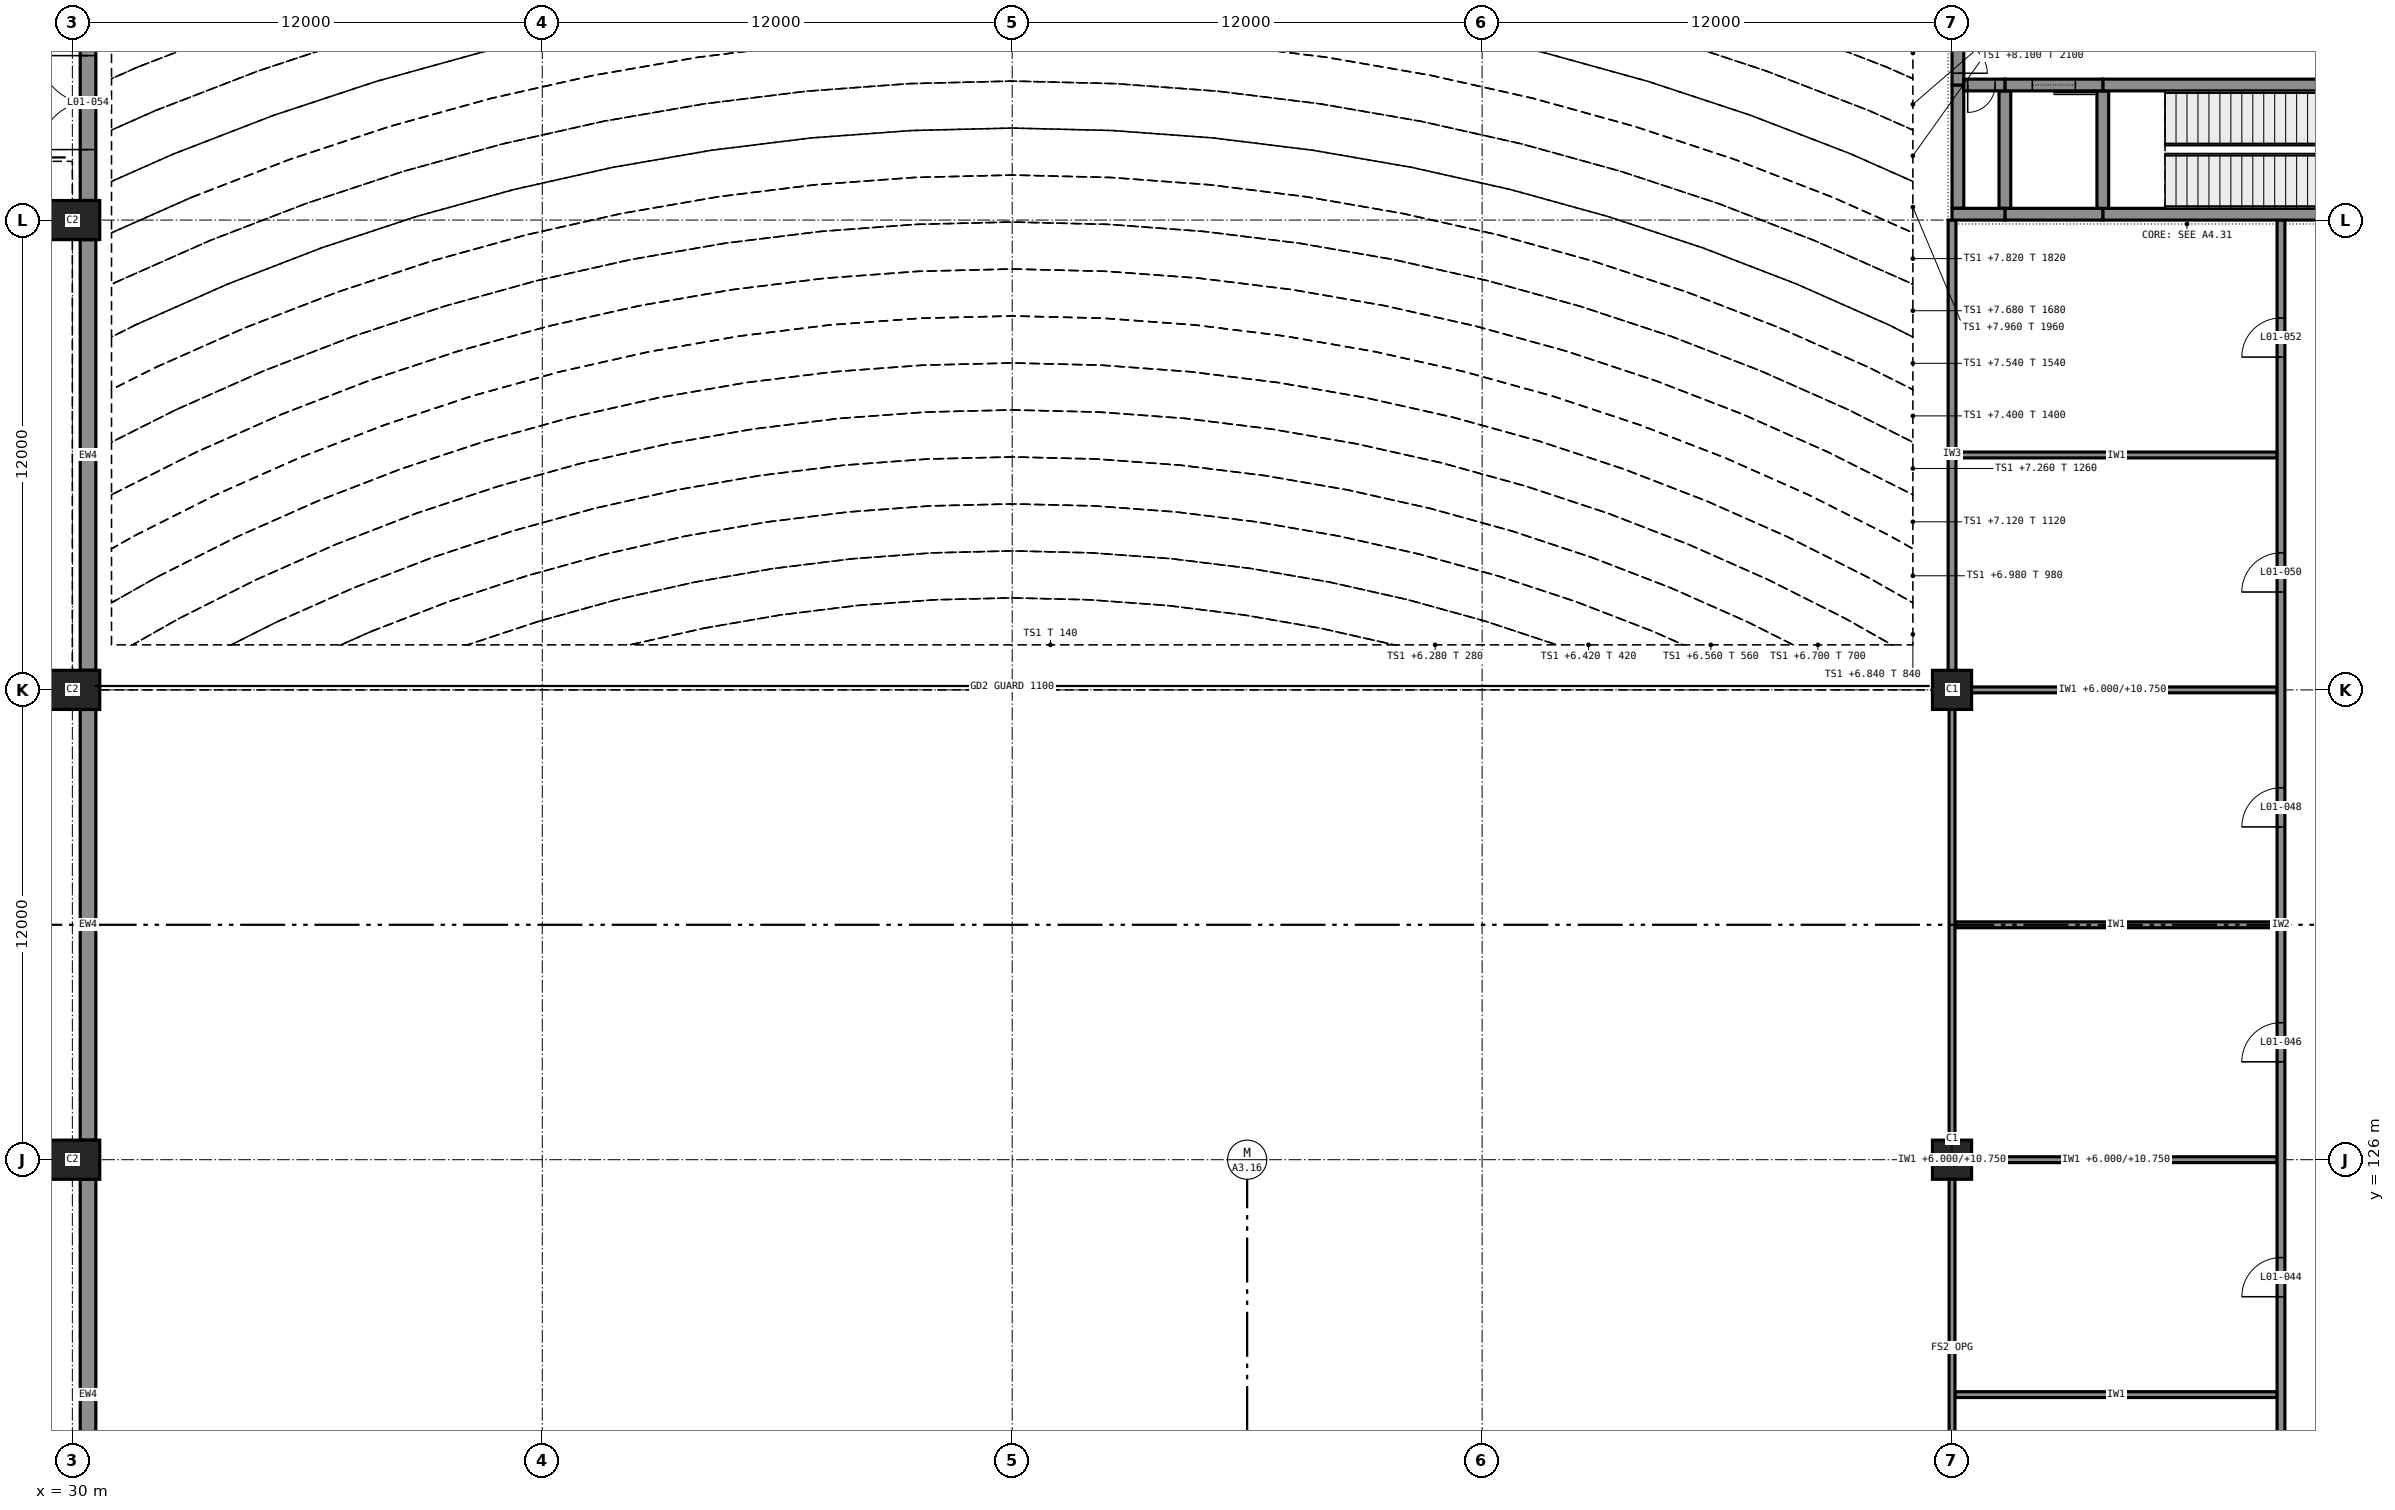
"""IFC4 building model, lengths in metres.
Left out: names, types, materials, properties, quantities, classifications, styles, units other than length and angle.
Written with IfcOpenShell. Run it as: python <this file> out.ifc"""

import sys

from ifc_helpers import new_model, si_unit, direction, frame, frame_2d, origin, origin_2d, place, context, subcontext, project, spatial, rectangle, extrude, element, fill, save


model = new_model("IFC4")
c1 = context("Model", 3, precision=1e-05, world=origin(), true_north=direction((0.0, 1.0)))
c2 = subcontext(c1, "Body", "Model", "MODEL_VIEW")
j1 = project(units=[si_unit("LENGTHUNIT", "METRE"), si_unit("PLANEANGLEUNIT", "RADIAN")], contexts=[c1])
p1 = place(None, origin())
s1 = spatial("IfcSite", under=j1, at=p1, CompositionType="ELEMENT")
p2 = place(p1, origin())
s2 = spatial("IfcBuilding", under=s1, at=p2, CompositionType="ELEMENT")
p3 = place(p2, frame((0.0, 0.0, 6.0)))
s3 = spatial("IfcBuildingStorey", under=s2, at=p3, CompositionType="ELEMENT", Elevation=6.0)
for number, where, z_axis, x_axis in (
    (1, (30.0, 126.0, 0.0), (0.0, 0.0, 1.0), (1.0, 0.0, 0.0)),
    (2, (30.0, 138.0, 0.0), (0.0, 0.0, 1.0), (1.0, 0.0, 0.0)),
    (3, (30.0, 150.0, 0.0), (0.0, 0.0, 1.0), (1.0, 0.0, 0.0)),
):
    element("IfcColumn", number, at=place(p3, frame(where, z_axis=z_axis, x_axis=x_axis)), inside=s3, PredefinedType="COLUMN", context=c2, shape_type="SweptSolid", body=[
        extrude(rectangle(XDim=1.4, YDim=1.0, at=origin_2d()), origin(), (0.0, 0.0, 1.0), 6.0),
    ])
for number, where, z_axis, x_axis in (
    (4, (78.0, 126.0, 0.0), (0.0, 0.0, 1.0), (1.0, 0.0, 0.0)),
    (5, (78.0, 138.0, 0.0), (0.0, 0.0, 1.0), (1.0, 0.0, 0.0)),
):
    element("IfcColumn", number, at=place(p3, frame(where, z_axis=z_axis, x_axis=x_axis)), inside=s3, PredefinedType="COLUMN", context=c2, shape_type="SweptSolid", body=[
        extrude(rectangle(XDim=1.0, YDim=1.0, at=origin_2d()), origin(), (0.0, 0.0, 1.0), 6.0),
    ])
p4 = place(p3, frame((90.0, 150.15, 0.0), z_axis=(0.0, 0.0, 1.0), x_axis=(-1.0, 0.0, 0.0)))
e6 = element("IfcWall", 6, at=p4, inside=s3, PredefinedType="SHEAR", context=c2, shape_type="SweptSolid", body=[
    extrude(rectangle(XDim=8.15, YDim=0.3, at=frame_2d((4.075, 0.0))), origin(), (0.0, 0.0, 1.0), 5.75),
])
p5 = place(p4, frame((0.65, 0.0, 0.0)))
e7 = element("IfcOpeningElement", 7, at=p5, cuts=e6, PredefinedType="OPENING", context=c2, shape_type="SweptSolid", body=[
    extrude(rectangle(XDim=0.9, YDim=2.1, at=frame_2d((0.45, 1.05))), frame((0.0, 0.16, 0.0), z_axis=(0.0, -1.0, 0.0), x_axis=(1.0, 0.0, 0.0)), (0.0, 0.0, 1.0), 0.32),
])
p6 = place(p3, frame((81.85, 150.15, 0.0), z_axis=(0.0, 0.0, 1.0), x_axis=(-1.0, 0.0, 0.0)))
e8 = element("IfcWall", 8, at=p6, inside=s3, PredefinedType="SHEAR", context=c2, shape_type="SweptSolid", body=[
    extrude(rectangle(XDim=2.5, YDim=0.3, at=frame_2d((1.25, 0.0))), origin(), (0.0, 0.0, 1.0), 5.75),
])
p7 = place(p3, frame((79.35, 150.15, 0.0), z_axis=(0.0, 0.0, 1.0), x_axis=(-1.0, 0.0, 0.0)))
e9 = element("IfcWall", 9, at=p7, inside=s3, PredefinedType="SHEAR", context=c2, shape_type="SweptSolid", body=[
    extrude(rectangle(XDim=1.35, YDim=0.3, at=frame_2d((0.675, 0.0))), origin(), (0.0, 0.0, 1.0), 5.75),
])
p8 = place(p3, frame((89.7, 153.45, 0.0), z_axis=(0.0, 0.0, 1.0), x_axis=(-1.0, 0.0, 0.0)))
e10 = element("IfcWall", 10, at=p8, inside=s3, PredefinedType="SHEAR", context=c2, shape_type="SweptSolid", body=[
    extrude(rectangle(XDim=7.85, YDim=0.3, at=frame_2d((3.925, 0.0))), origin(), (0.0, 0.0, 1.0), 5.75),
])
p9 = place(p8, frame((0.5, 0.0, 0.0)))
e11 = element("IfcOpeningElement", 11, at=p9, cuts=e10, PredefinedType="OPENING", context=c2, shape_type="SweptSolid", body=[
    extrude(rectangle(XDim=1.0, YDim=2.1, at=frame_2d((0.5, 1.05))), frame((0.0, 0.16, 0.0), z_axis=(0.0, -1.0, 0.0), x_axis=(1.0, 0.0, 0.0)), (0.0, 0.0, 1.0), 0.32),
])
p10 = place(p3, frame((81.85, 153.45, 0.0), z_axis=(0.0, 0.0, 1.0), x_axis=(-1.0, 0.0, 0.0)))
e12 = element("IfcWall", 12, at=p10, inside=s3, PredefinedType="SHEAR", context=c2, shape_type="SweptSolid", body=[
    extrude(rectangle(XDim=2.5, YDim=0.3, at=frame_2d((1.25, 0.0))), origin(), (0.0, 0.0, 1.0), 5.75),
])
p11 = place(p10, frame((0.7, 0.0, 0.0)))
e13 = element("IfcOpeningElement", 13, at=p11, cuts=e12, PredefinedType="OPENING", context=c2, shape_type="SweptSolid", body=[
    extrude(rectangle(XDim=1.1, YDim=2.1, at=frame_2d((0.55, 1.05))), frame((0.0, 0.16, 0.0), z_axis=(0.0, -1.0, 0.0), x_axis=(1.0, 0.0, 0.0)), (0.0, 0.0, 1.0), 0.32),
])
p12 = place(p3, frame((79.35, 153.45, 0.0), z_axis=(0.0, 0.0, 1.0), x_axis=(-1.0, 0.0, 0.0)))
e14 = element("IfcWall", 14, at=p12, inside=s3, PredefinedType="SHEAR", context=c2, shape_type="SweptSolid", body=[
    extrude(rectangle(XDim=1.05, YDim=0.3, at=frame_2d((0.525, 0.0))), origin(), (0.0, 0.0, 1.0), 5.75),
])
p13 = place(p12, frame((0.25, 0.0, 0.0)))
e15 = element("IfcOpeningElement", 15, at=p13, cuts=e14, PredefinedType="OPENING", context=c2, shape_type="SweptSolid", body=[
    extrude(rectangle(XDim=0.7, YDim=2.1, at=frame_2d((0.35, 1.05))), frame((0.0, 0.16, 0.0), z_axis=(0.0, -1.0, 0.0), x_axis=(1.0, 0.0, 0.0)), (0.0, 0.0, 1.0), 0.32),
])
p14 = place(p3, frame((78.15, 150.3, 0.0), z_axis=(0.0, 0.0, 1.0), x_axis=(0.0, 1.0, 0.0)))
e16 = element("IfcWall", 16, at=p14, inside=s3, PredefinedType="SHEAR", context=c2, shape_type="SweptSolid", body=[
    extrude(rectangle(XDim=3.15, YDim=0.3, at=frame_2d((1.575, 0.0))), origin(), (0.0, 0.0, 1.0), 5.75),
])
p15 = place(p3, frame((78.15, 153.45, 0.0), z_axis=(0.0, 0.0, 1.0), x_axis=(0.0, 1.0, 0.0)))
e17 = element("IfcWall", 17, at=p15, inside=s3, PredefinedType="SHEAR", context=c2, shape_type="SweptSolid", body=[
    extrude(rectangle(XDim=5.1, YDim=0.3, at=frame_2d((2.55, 0.0))), origin(), (0.0, 0.0, 1.0), 5.75),
])
p16 = place(p15, frame((0.3, 0.0, 0.0)))
e18 = element("IfcOpeningElement", 18, at=p16, cuts=e17, PredefinedType="OPENING", context=c2, shape_type="SweptSolid", body=[
    extrude(rectangle(XDim=1.5, YDim=2.1, at=frame_2d((0.75, 1.05))), frame((0.0, 0.16, 0.0), z_axis=(0.0, -1.0, 0.0), x_axis=(1.0, 0.0, 0.0)), (0.0, 0.0, 1.0), 0.32),
])
for number, where, z_axis, x_axis in (
    (19, (81.85, 150.3, 0.0), (0.0, 0.0, 1.0), (0.0, 1.0, 0.0)),
    (20, (79.35, 150.3, 0.0), (0.0, 0.0, 1.0), (0.0, 1.0, 0.0)),
):
    element("IfcWall", number, at=place(p3, frame(where, z_axis=z_axis, x_axis=x_axis)), inside=s3, PredefinedType="SHEAR", context=c2, shape_type="SweptSolid", body=[
        extrude(rectangle(XDim=3.0, YDim=0.3, at=frame_2d((1.5, 0.0))), origin(), (0.0, 0.0, 1.0), 5.75),
    ])
for number, where, z_axis, x_axis in (
    (21, (30.4, 114.5, 0.0), (0.0, 0.0, 1.0), (0.0, 1.0, 0.0)),
    (22, (30.4, 126.5, 0.0), (0.0, 0.0, 1.0), (0.0, 1.0, 0.0)),
    (23, (30.4, 138.5, 0.0), (0.0, 0.0, 1.0), (0.0, 1.0, 0.0)),
):
    element("IfcWall", number, at=place(p3, frame(where, z_axis=z_axis, x_axis=x_axis)), inside=s3, PredefinedType="SOLIDWALL", context=c2, shape_type="SweptSolid", body=[
        extrude(rectangle(XDim=11.0, YDim=0.4, at=frame_2d((5.5, 0.0))), origin(), (0.0, 0.0, 1.0), 6.0),
    ])
p17 = place(p3, frame((30.4, 150.5, 0.0), z_axis=(0.0, 0.0, 1.0), x_axis=(0.0, 1.0, 0.0)))
e24 = element("IfcWall", 24, at=p17, inside=s3, PredefinedType="SOLIDWALL", context=c2, shape_type="SweptSolid", body=[
    extrude(rectangle(XDim=11.0, YDim=0.4, at=frame_2d((5.5, 0.0))), origin(), (0.0, 0.0, 1.0), 6.0),
])
p18 = place(p17, frame((1.3, 0.0, 0.0)))
e25 = element("IfcOpeningElement", 25, at=p18, cuts=e24, PredefinedType="OPENING", context=c2, shape_type="SweptSolid", body=[
    extrude(rectangle(XDim=2.4, YDim=2.4, at=frame_2d((1.2, 1.2))), frame((0.0, 0.21, 0.0), z_axis=(0.0, -1.0, 0.0), x_axis=(1.0, 0.0, 0.0)), (0.0, 0.0, 1.0), 0.42),
])
p19 = place(p3, frame((78.075, 120.0, 0.0), z_axis=(0.0, 0.0, 1.0), x_axis=(1.0, 0.0, 0.0)))
e26 = element("IfcWall", 26, at=p19, inside=s3, PredefinedType="PARTITIONING", context=c2, shape_type="SweptSolid", body=[
    extrude(rectangle(XDim=8.225, YDim=0.15, at=frame_2d((4.113, 0.0))), origin(), (0.0, 0.0, 1.0), 5.75),
])
p20 = place(p3, frame((78.075, 126.0, 0.0), z_axis=(0.0, 0.0, 1.0), x_axis=(1.0, 0.0, 0.0)))
e27 = element("IfcWall", 27, at=p20, inside=s3, PredefinedType="PARTITIONING", context=c2, shape_type="SweptSolid", body=[
    extrude(rectangle(XDim=8.225, YDim=0.15, at=frame_2d((4.113, 0.0))), origin(), (0.0, 0.0, 1.0), 4.75),
])
p21 = place(p3, frame((78.075, 132.0, 0.0), z_axis=(0.0, 0.0, 1.0), x_axis=(1.0, 0.0, 0.0)))
e28 = element("IfcWall", 28, at=p21, inside=s3, PredefinedType="PARTITIONING", context=c2, shape_type="SweptSolid", body=[
    extrude(rectangle(XDim=8.225, YDim=0.15, at=frame_2d((4.113, 0.0))), origin(), (0.0, 0.0, 1.0), 5.75),
])
p22 = place(p3, frame((77.9, 138.0, 0.0), z_axis=(0.0, 0.0, 1.0), x_axis=(1.0, 0.0, 0.0)))
e29 = element("IfcWall", 29, at=p22, inside=s3, PredefinedType="PARTITIONING", context=c2, shape_type="SweptSolid", body=[
    extrude(rectangle(XDim=8.4, YDim=0.15, at=frame_2d((4.2, 0.0))), origin(), (0.0, 0.0, 1.0), 4.75),
])
p23 = place(p3, frame((78.1, 144.0, 0.0), z_axis=(0.0, 0.0, 1.0), x_axis=(1.0, 0.0, 0.0)))
e30 = element("IfcWall", 30, at=p23, inside=s3, PredefinedType="PARTITIONING", context=c2, shape_type="SweptSolid", body=[
    extrude(rectangle(XDim=8.2, YDim=0.15, at=frame_2d((4.1, 0.0))), origin(), (0.0, 0.0, 1.0), 5.75),
])
p24 = place(p3, frame((78.0, 114.1, 0.0), z_axis=(0.0, 0.0, 1.0), x_axis=(0.0, 1.0, 0.0)))
e31 = element("IfcWall", 31, at=p24, inside=s3, PredefinedType="PARTITIONING", context=c2, shape_type="SweptSolid", body=[
    extrude(rectangle(XDim=23.825, YDim=0.15, at=frame_2d((11.913, 0.0))), origin(), (0.0, 0.0, 1.0), 4.75),
])
p25 = place(p3, frame((78.0, 138.075, 0.0), z_axis=(0.0, 0.0, 1.0), x_axis=(0.0, 1.0, 0.0)))
e32 = element("IfcWall", 32, at=p25, inside=s3, PredefinedType="PARTITIONING", context=c2, shape_type="SweptSolid", body=[
    extrude(rectangle(XDim=11.925, YDim=0.2, at=frame_2d((5.962, 0.0))), origin(), (0.0, 0.0, 1.0), 4.75),
])
p26 = place(p3, frame((86.4, 114.0, 0.0), z_axis=(0.0, 0.0, 1.0), x_axis=(0.0, 1.0, 0.0)))
e33 = element("IfcWall", 33, at=p26, inside=s3, PredefinedType="PARTITIONING", context=c2, shape_type="SweptSolid", body=[
    extrude(rectangle(XDim=36.0, YDim=0.2, at=frame_2d((18.0, 0.0))), origin(), (0.0, 0.0, 1.0), 5.75),
])
p27 = place(p26, frame((2.5, 0.0, 0.0)))
e34 = element("IfcOpeningElement", 34, at=p27, cuts=e33, PredefinedType="OPENING", context=c2, shape_type="SweptSolid", body=[
    extrude(rectangle(XDim=1.0, YDim=2.1, at=frame_2d((0.5, 1.05))), frame((0.0, 0.11, 0.0), z_axis=(0.0, -1.0, 0.0), x_axis=(1.0, 0.0, 0.0)), (0.0, 0.0, 1.0), 0.22),
])
p28 = place(p26, frame((8.5, 0.0, 0.0)))
e35 = element("IfcOpeningElement", 35, at=p28, cuts=e33, PredefinedType="OPENING", context=c2, shape_type="SweptSolid", body=[
    extrude(rectangle(XDim=1.0, YDim=2.1, at=frame_2d((0.5, 1.05))), frame((0.0, 0.11, 0.0), z_axis=(0.0, -1.0, 0.0), x_axis=(1.0, 0.0, 0.0)), (0.0, 0.0, 1.0), 0.22),
])
p29 = place(p26, frame((14.5, 0.0, 0.0)))
e36 = element("IfcOpeningElement", 36, at=p29, cuts=e33, PredefinedType="OPENING", context=c2, shape_type="SweptSolid", body=[
    extrude(rectangle(XDim=1.0, YDim=2.1, at=frame_2d((0.5, 1.05))), frame((0.0, 0.11, 0.0), z_axis=(0.0, -1.0, 0.0), x_axis=(1.0, 0.0, 0.0)), (0.0, 0.0, 1.0), 0.22),
])
p30 = place(p26, frame((20.5, 0.0, 0.0)))
e37 = element("IfcOpeningElement", 37, at=p30, cuts=e33, PredefinedType="OPENING", context=c2, shape_type="SweptSolid", body=[
    extrude(rectangle(XDim=1.0, YDim=2.1, at=frame_2d((0.5, 1.05))), frame((0.0, 0.11, 0.0), z_axis=(0.0, -1.0, 0.0), x_axis=(1.0, 0.0, 0.0)), (0.0, 0.0, 1.0), 0.22),
])
p31 = place(p26, frame((26.5, 0.0, 0.0)))
e38 = element("IfcOpeningElement", 38, at=p31, cuts=e33, PredefinedType="OPENING", context=c2, shape_type="SweptSolid", body=[
    extrude(rectangle(XDim=1.0, YDim=2.1, at=frame_2d((0.5, 1.05))), frame((0.0, 0.11, 0.0), z_axis=(0.0, -1.0, 0.0), x_axis=(1.0, 0.0, 0.0)), (0.0, 0.0, 1.0), 0.22),
])
p32 = place(p26, frame((32.5, 0.0, 0.0)))
e39 = element("IfcOpeningElement", 39, at=p32, cuts=e33, PredefinedType="OPENING", context=c2, shape_type="SweptSolid", body=[
    extrude(rectangle(XDim=1.0, YDim=2.1, at=frame_2d((0.5, 1.05))), frame((0.0, 0.11, 0.0), z_axis=(0.0, -1.0, 0.0), x_axis=(1.0, 0.0, 0.0)), (0.0, 0.0, 1.0), 0.22),
])
p33 = place(p28, origin())
e40 = element("IfcDoor", 40, at=p33, inside=s3, OperationType="SINGLE_SWING_RIGHT", PredefinedType="DOOR", context=c2, shape_type="SweptSolid", body=[
    extrude(rectangle(XDim=1.0, YDim=2.1, at=frame_2d((0.5, 1.05))), frame((0.0, 0.025, 0.0), z_axis=(0.0, -1.0, 0.0), x_axis=(1.0, 0.0, 0.0)), (0.0, 0.0, 1.0), 0.05),
])
fill(e35, e40)
p34 = place(p29, origin())
e41 = element("IfcDoor", 41, at=p34, inside=s3, OperationType="SINGLE_SWING_RIGHT", PredefinedType="DOOR", context=c2, shape_type="SweptSolid", body=[
    extrude(rectangle(XDim=1.0, YDim=2.1, at=frame_2d((0.5, 1.05))), frame((0.0, 0.025, 0.0), z_axis=(0.0, -1.0, 0.0), x_axis=(1.0, 0.0, 0.0)), (0.0, 0.0, 1.0), 0.05),
])
fill(e36, e41)
p35 = place(p30, origin())
e42 = element("IfcDoor", 42, at=p35, inside=s3, OperationType="SINGLE_SWING_RIGHT", PredefinedType="DOOR", context=c2, shape_type="SweptSolid", body=[
    extrude(rectangle(XDim=1.0, YDim=2.1, at=frame_2d((0.5, 1.05))), frame((0.0, 0.025, 0.0), z_axis=(0.0, -1.0, 0.0), x_axis=(1.0, 0.0, 0.0)), (0.0, 0.0, 1.0), 0.05),
])
fill(e37, e42)
p36 = place(p31, origin())
e43 = element("IfcDoor", 43, at=p36, inside=s3, OperationType="SINGLE_SWING_RIGHT", PredefinedType="DOOR", context=c2, shape_type="SweptSolid", body=[
    extrude(rectangle(XDim=1.0, YDim=2.1, at=frame_2d((0.5, 1.05))), frame((0.0, 0.025, 0.0), z_axis=(0.0, -1.0, 0.0), x_axis=(1.0, 0.0, 0.0)), (0.0, 0.0, 1.0), 0.05),
])
fill(e38, e43)
p37 = place(p32, origin())
e44 = element("IfcDoor", 44, at=p37, inside=s3, OperationType="SINGLE_SWING_RIGHT", PredefinedType="DOOR", context=c2, shape_type="SweptSolid", body=[
    extrude(rectangle(XDim=1.0, YDim=2.1, at=frame_2d((0.5, 1.05))), frame((0.0, 0.025, 0.0), z_axis=(0.0, -1.0, 0.0), x_axis=(1.0, 0.0, 0.0)), (0.0, 0.0, 1.0), 0.05),
])
fill(e39, e44)
p38 = place(p18, origin())
e45 = element("IfcDoor", 45, at=p38, inside=s3, OperationType="DOUBLE_DOOR_SINGLE_SWING", PredefinedType="DOOR", context=c2, shape_type="SweptSolid", body=[
    extrude(rectangle(XDim=2.4, YDim=2.4, at=frame_2d((1.2, 1.2))), frame((0.0, 0.025, 0.0), z_axis=(0.0, -1.0, 0.0), x_axis=(1.0, 0.0, 0.0)), (0.0, 0.0, 1.0), 0.05),
])
fill(e25, e45)
p39 = place(p13, origin())
e46 = element("IfcDoor", 46, at=p39, inside=s3, OperationType="SINGLE_SWING_LEFT", PredefinedType="DOOR", context=c2, shape_type="SweptSolid", body=[
    extrude(rectangle(XDim=0.7, YDim=2.1, at=frame_2d((0.35, 1.05))), frame((0.0, 0.025, 0.0), z_axis=(0.0, -1.0, 0.0), x_axis=(1.0, 0.0, 0.0)), (0.0, 0.0, 1.0), 0.05),
])
fill(e15, e46)
p40 = place(p11, origin())
e47 = element("IfcDoor", 47, at=p40, inside=s3, OperationType="SLIDING_TO_LEFT", PredefinedType="DOOR", context=c2, shape_type="SweptSolid", body=[
    extrude(rectangle(XDim=1.1, YDim=2.1, at=frame_2d((0.55, 1.05))), frame((0.0, 0.025, 0.0), z_axis=(0.0, -1.0, 0.0), x_axis=(1.0, 0.0, 0.0)), (0.0, 0.0, 1.0), 0.05),
])
fill(e13, e47)
p41 = place(p16, frame((1.5, 0.0, 0.0), z_axis=(0.0, 0.0, 1.0), x_axis=(-1.0, 0.0, 0.0)))
e48 = element("IfcDoor", 48, at=p41, inside=s3, OperationType="DOUBLE_DOOR_SINGLE_SWING", PredefinedType="DOOR", context=c2, shape_type="SweptSolid", body=[
    extrude(rectangle(XDim=1.5, YDim=2.1, at=frame_2d((0.75, 1.05))), frame((0.0, 0.025, 0.0), z_axis=(0.0, -1.0, 0.0), x_axis=(1.0, 0.0, 0.0)), (0.0, 0.0, 1.0), 0.05),
])
fill(e18, e48)
save(model, sys.argv[1])
